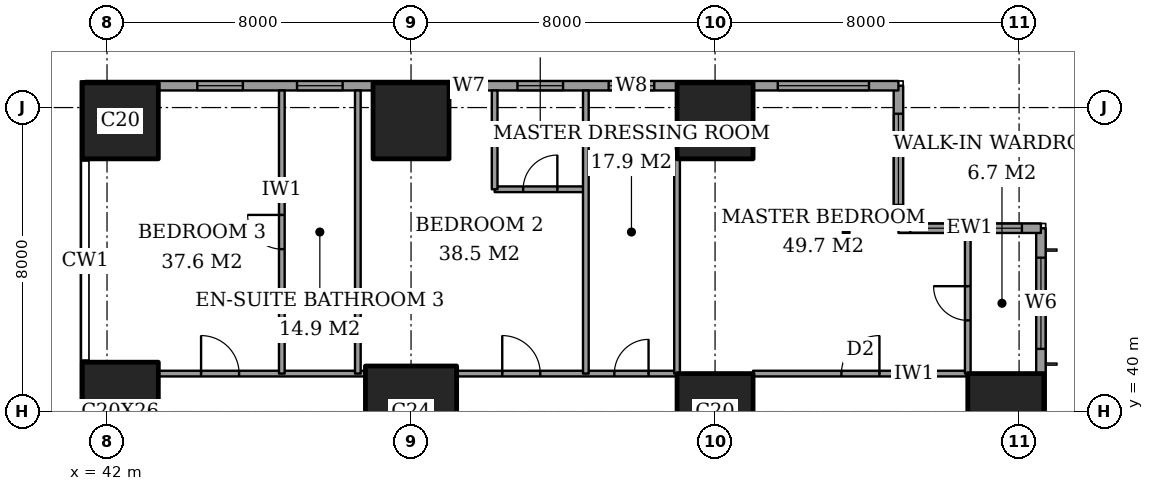
"""IFC4 building model, lengths in metres.
Left out: names, types, materials, properties, quantities, classifications, styles, units other than length and angle.
Written with IfcOpenShell. Run it as: python <this file> out.ifc"""

import sys

from ifc_helpers import new_model, si_unit, direction, frame, frame_2d, origin, origin_2d, place, context, subcontext, project, spatial, rectangle, extrude, element, fill, save


model = new_model("IFC4")
c1 = context("Model", 3, precision=1e-05, world=origin(), true_north=direction((0.0, 1.0)))
c2 = subcontext(c1, "Body", "Model", "MODEL_VIEW")
j1 = project(units=[si_unit("LENGTHUNIT", "METRE"), si_unit("PLANEANGLEUNIT", "RADIAN")], contexts=[c1])
p1 = place(None, origin())
s1 = spatial("IfcSite", under=j1, at=p1, CompositionType="ELEMENT")
p2 = place(p1, origin())
s2 = spatial("IfcBuilding", under=s1, at=p2, CompositionType="ELEMENT")
p3 = place(p2, frame((0.0, 0.0, 40.4)))
s3 = spatial("IfcBuildingStorey", under=s2, at=p3, CompositionType="ELEMENT", Elevation=40.4)
p4 = place(p3, frame((42.35, 40.0, 0.0), z_axis=(0.0, 0.0, 1.0), x_axis=(1.0, 0.0, 0.0)))
e1 = element("IfcColumn", 1, at=p4, inside=s3, PredefinedType="COLUMN", context=c2, shape_type="SweptSolid", body=[
    extrude(rectangle(XDim=2.0, YDim=2.6, at=origin_2d()), origin(), (0.0, 0.0, 1.0), 3.6),
])
p5 = place(p3, frame((42.35, 47.65, 0.0), z_axis=(0.0, 0.0, 1.0), x_axis=(1.0, 0.0, 0.0)))
e2 = element("IfcColumn", 2, at=p5, inside=s3, PredefinedType="COLUMN", context=c2, shape_type="SweptSolid", body=[
    extrude(rectangle(XDim=2.0, YDim=2.0, at=origin_2d()), origin(), (0.0, 0.0, 1.0), 3.6),
])
p6 = place(p3, frame((50.0, 40.0, 0.0), z_axis=(0.0, 0.0, 1.0), x_axis=(1.0, 0.0, 0.0)))
e3 = element("IfcColumn", 3, at=p6, inside=s3, PredefinedType="COLUMN", context=c2, shape_type="SweptSolid", body=[
    extrude(rectangle(XDim=2.4, YDim=2.4, at=origin_2d()), origin(), (0.0, 0.0, 1.0), 3.6),
])
for number, where, z_axis, x_axis in (
    (4, (50.0, 47.65, 0.0), (0.0, 0.0, 1.0), (1.0, 0.0, 0.0)),
    (5, (58.0, 40.0, 0.0), (0.0, 0.0, 1.0), (1.0, 0.0, 0.0)),
    (6, (58.0, 47.65, 0.0), (0.0, 0.0, 1.0), (1.0, 0.0, 0.0)),
    (7, (65.65, 40.0, 0.0), (0.0, 0.0, 1.0), (1.0, 0.0, 0.0)),
):
    element("IfcColumn", number, at=place(p3, frame(where, z_axis=z_axis, x_axis=x_axis)), inside=s3, PredefinedType="COLUMN", context=c2, shape_type="SweptSolid", body=[
        extrude(rectangle(XDim=2.0, YDim=2.0, at=origin_2d()), origin(), (0.0, 0.0, 1.0), 3.6),
    ])
p7 = place(p3, frame((66.575, 3.175, 0.0), z_axis=(0.0, 0.0, 1.0), x_axis=(0.0, 1.0, 0.0)))
e8 = element("IfcWall", 8, at=p7, inside=s3, PredefinedType="SOLIDWALL", context=c2, shape_type="SweptSolid", body=[
    extrude(rectangle(XDim=41.65, YDim=0.25, at=frame_2d((20.825, 0.0))), origin(), (0.0, 0.0, 1.0), 3.6),
])
p8 = place(p7, frame((0.775, 0.0, 0.6)))
e9 = element("IfcOpeningElement", 9, at=p8, cuts=e8, PredefinedType="OPENING", context=c2, shape_type="SweptSolid", body=[
    extrude(rectangle(XDim=2.4, YDim=2.0, at=frame_2d((1.2, 1.0))), frame((0.0, 0.135, 0.0), z_axis=(0.0, -1.0, 0.0), x_axis=(1.0, 0.0, 0.0)), (0.0, 0.0, 1.0), 0.27),
])
p9 = place(p7, frame((6.1, 0.0, 0.6)))
e10 = element("IfcOpeningElement", 10, at=p9, cuts=e8, PredefinedType="OPENING", context=c2, shape_type="SweptSolid", body=[
    extrude(rectangle(XDim=1.2, YDim=2.0, at=frame_2d((0.6, 1.0))), frame((0.0, 0.135, 0.0), z_axis=(0.0, -1.0, 0.0), x_axis=(1.0, 0.0, 0.0)), (0.0, 0.0, 1.0), 0.27),
])
p10 = place(p7, frame((8.275, 0.0, 0.6)))
e11 = element("IfcOpeningElement", 11, at=p10, cuts=e8, PredefinedType="OPENING", context=c2, shape_type="SweptSolid", body=[
    extrude(rectangle(XDim=2.4, YDim=2.0, at=frame_2d((1.2, 1.0))), frame((0.0, 0.135, 0.0), z_axis=(0.0, -1.0, 0.0), x_axis=(1.0, 0.0, 0.0)), (0.0, 0.0, 1.0), 0.27),
])
p11 = place(p7, frame((15.775, 0.0, 0.6)))
e12 = element("IfcOpeningElement", 12, at=p11, cuts=e8, PredefinedType="OPENING", context=c2, shape_type="SweptSolid", body=[
    extrude(rectangle(XDim=2.4, YDim=2.0, at=frame_2d((1.2, 1.0))), frame((0.0, 0.135, 0.0), z_axis=(0.0, -1.0, 0.0), x_axis=(1.0, 0.0, 0.0)), (0.0, 0.0, 1.0), 0.27),
])
p12 = place(p7, frame((23.475, 0.0, 0.6)))
e13 = element("IfcOpeningElement", 13, at=p12, cuts=e8, PredefinedType="OPENING", context=c2, shape_type="SweptSolid", body=[
    extrude(rectangle(XDim=2.4, YDim=2.0, at=frame_2d((1.2, 1.0))), frame((0.0, 0.135, 0.0), z_axis=(0.0, -1.0, 0.0), x_axis=(1.0, 0.0, 0.0)), (0.0, 0.0, 1.0), 0.27),
])
p13 = place(p7, frame((30.975, 0.0, 0.6)))
e14 = element("IfcOpeningElement", 14, at=p13, cuts=e8, PredefinedType="OPENING", context=c2, shape_type="SweptSolid", body=[
    extrude(rectangle(XDim=2.4, YDim=2.0, at=frame_2d((1.2, 1.0))), frame((0.0, 0.135, 0.0), z_axis=(0.0, -1.0, 0.0), x_axis=(1.0, 0.0, 0.0)), (0.0, 0.0, 1.0), 0.27),
])
p14 = place(p7, frame((34.5, 0.0, 0.6)))
e15 = element("IfcOpeningElement", 15, at=p14, cuts=e8, PredefinedType="OPENING", context=c2, shape_type="SweptSolid", body=[
    extrude(rectangle(XDim=1.2, YDim=2.0, at=frame_2d((0.6, 1.0))), frame((0.0, 0.135, 0.0), z_axis=(0.0, -1.0, 0.0), x_axis=(1.0, 0.0, 0.0)), (0.0, 0.0, 1.0), 0.27),
])
p15 = place(p7, frame((38.475, 0.0, 0.6)))
e16 = element("IfcOpeningElement", 16, at=p15, cuts=e8, PredefinedType="OPENING", context=c2, shape_type="SweptSolid", body=[
    extrude(rectangle(XDim=2.4, YDim=2.0, at=frame_2d((1.2, 1.0))), frame((0.0, 0.135, 0.0), z_axis=(0.0, -1.0, 0.0), x_axis=(1.0, 0.0, 0.0)), (0.0, 0.0, 1.0), 0.27),
])
p16 = place(p3, frame((66.575, 44.825, 0.0), z_axis=(0.0, 0.0, 1.0), x_axis=(-1.0, 0.0, 0.0)))
e17 = element("IfcWall", 17, at=p16, inside=s3, PredefinedType="SOLIDWALL", context=c2, shape_type="SweptSolid", body=[
    extrude(rectangle(XDim=3.75, YDim=0.25, at=frame_2d((1.875, 0.0))), origin(), (0.0, 0.0, 1.0), 3.6),
])
p17 = place(p16, frame((0.5, 0.0, 0.6)))
e18 = element("IfcOpeningElement", 18, at=p17, cuts=e17, PredefinedType="OPENING", context=c2, shape_type="SweptSolid", body=[
    extrude(rectangle(XDim=1.2, YDim=2.0, at=frame_2d((0.6, 1.0))), frame((0.0, 0.135, 0.0), z_axis=(0.0, -1.0, 0.0), x_axis=(1.0, 0.0, 0.0)), (0.0, 0.0, 1.0), 0.27),
])
p18 = place(p16, frame((2.238, 0.0, 0.6)))
e19 = element("IfcOpeningElement", 19, at=p18, cuts=e17, PredefinedType="OPENING", context=c2, shape_type="SweptSolid", body=[
    extrude(rectangle(XDim=1.2, YDim=2.0, at=frame_2d((0.6, 1.0))), frame((0.0, 0.135, 0.0), z_axis=(0.0, -1.0, 0.0), x_axis=(1.0, 0.0, 0.0)), (0.0, 0.0, 1.0), 0.27),
])
p19 = place(p3, frame((62.825, 44.825, 0.0), z_axis=(0.0, 0.0, 1.0), x_axis=(0.0, 1.0, 0.0)))
e20 = element("IfcWall", 20, at=p19, inside=s3, PredefinedType="SOLIDWALL", context=c2, shape_type="SweptSolid", body=[
    extrude(rectangle(XDim=3.75, YDim=0.25, at=frame_2d((1.875, 0.0))), origin(), (0.0, 0.0, 1.0), 3.6),
])
p20 = place(p19, frame((0.613, 0.0, 0.6)))
e21 = element("IfcOpeningElement", 21, at=p20, cuts=e20, PredefinedType="OPENING", context=c2, shape_type="SweptSolid", body=[
    extrude(rectangle(XDim=2.4, YDim=2.0, at=frame_2d((1.2, 1.0))), frame((0.0, 0.135, 0.0), z_axis=(0.0, -1.0, 0.0), x_axis=(1.0, 0.0, 0.0)), (0.0, 0.0, 1.0), 0.27),
])
p21 = place(p3, frame((62.825, 48.575, 0.0), z_axis=(0.0, 0.0, 1.0), x_axis=(-1.0, 0.0, 0.0)))
e22 = element("IfcWall", 22, at=p21, inside=s3, PredefinedType="SOLIDWALL", context=c2, shape_type="SweptSolid", body=[
    extrude(rectangle(XDim=21.4, YDim=0.25, at=frame_2d((10.7, 0.0))), origin(), (0.0, 0.0, 1.0), 3.6),
])
p22 = place(p21, frame((0.775, 0.0, 0.6)))
e23 = element("IfcOpeningElement", 23, at=p22, cuts=e22, PredefinedType="OPENING", context=c2, shape_type="SweptSolid", body=[
    extrude(rectangle(XDim=2.4, YDim=2.0, at=frame_2d((1.2, 1.0))), frame((0.0, 0.135, 0.0), z_axis=(0.0, -1.0, 0.0), x_axis=(1.0, 0.0, 0.0)), (0.0, 0.0, 1.0), 0.27),
])
p23 = place(p21, frame((6.425, 0.0, 0.6)))
e24 = element("IfcOpeningElement", 24, at=p23, cuts=e22, PredefinedType="OPENING", context=c2, shape_type="SweptSolid", body=[
    extrude(rectangle(XDim=1.2, YDim=2.0, at=frame_2d((0.6, 1.0))), frame((0.0, 0.135, 0.0), z_axis=(0.0, -1.0, 0.0), x_axis=(1.0, 0.0, 0.0)), (0.0, 0.0, 1.0), 0.27),
])
p24 = place(p21, frame((8.825, 0.0, 0.6)))
e25 = element("IfcOpeningElement", 25, at=p24, cuts=e22, PredefinedType="OPENING", context=c2, shape_type="SweptSolid", body=[
    extrude(rectangle(XDim=1.2, YDim=2.0, at=frame_2d((0.6, 1.0))), frame((0.0, 0.135, 0.0), z_axis=(0.0, -1.0, 0.0), x_axis=(1.0, 0.0, 0.0)), (0.0, 0.0, 1.0), 0.27),
])
p25 = place(p21, frame((11.0, 0.0, 0.6)))
e26 = element("IfcOpeningElement", 26, at=p25, cuts=e22, PredefinedType="OPENING", context=c2, shape_type="SweptSolid", body=[
    extrude(rectangle(XDim=0.6, YDim=2.0, at=frame_2d((0.3, 1.0))), frame((0.0, 0.135, 0.0), z_axis=(0.0, -1.0, 0.0), x_axis=(1.0, 0.0, 0.0)), (0.0, 0.0, 1.0), 0.27),
])
p26 = place(p21, frame((14.625, 0.0, 0.6)))
e27 = element("IfcOpeningElement", 27, at=p26, cuts=e22, PredefinedType="OPENING", context=c2, shape_type="SweptSolid", body=[
    extrude(rectangle(XDim=1.2, YDim=2.0, at=frame_2d((0.6, 1.0))), frame((0.0, 0.135, 0.0), z_axis=(0.0, -1.0, 0.0), x_axis=(1.0, 0.0, 0.0)), (0.0, 0.0, 1.0), 0.27),
])
p27 = place(p21, frame((17.25, 0.0, 0.6)))
e28 = element("IfcOpeningElement", 28, at=p27, cuts=e22, PredefinedType="OPENING", context=c2, shape_type="SweptSolid", body=[
    extrude(rectangle(XDim=1.2, YDim=2.0, at=frame_2d((0.6, 1.0))), frame((0.0, 0.135, 0.0), z_axis=(0.0, -1.0, 0.0), x_axis=(1.0, 0.0, 0.0)), (0.0, 0.0, 1.0), 0.27),
])
p28 = place(p3, frame((43.35, 41.0, 0.0), z_axis=(0.0, 0.0, 1.0), x_axis=(1.0, 0.0, 0.0)))
e29 = element("IfcWall", 29, at=p28, inside=s3, PredefinedType="PARTITIONING", context=c2, shape_type="SweptSolid", body=[
    extrude(rectangle(XDim=5.45, YDim=0.15, at=frame_2d((2.725, 0.0))), origin(), (0.0, 0.0, 1.0), 3.35),
])
p29 = place(p28, frame((1.125, 0.0, 0.0)))
e30 = element("IfcOpeningElement", 30, at=p29, cuts=e29, PredefinedType="OPENING", context=c2, shape_type="SweptSolid", body=[
    extrude(rectangle(XDim=1.0, YDim=2.1, at=frame_2d((0.5, 1.05))), frame((0.0, 0.085, 0.0), z_axis=(0.0, -1.0, 0.0), x_axis=(1.0, 0.0, 0.0)), (0.0, 0.0, 1.0), 0.17),
])
p30 = place(p3, frame((51.2, 41.0, 0.0), z_axis=(0.0, 0.0, 1.0), x_axis=(1.0, 0.0, 0.0)))
e31 = element("IfcWall", 31, at=p30, inside=s3, PredefinedType="PARTITIONING", context=c2, shape_type="SweptSolid", body=[
    extrude(rectangle(XDim=5.8, YDim=0.15, at=frame_2d((2.9, 0.0))), origin(), (0.0, 0.0, 1.0), 3.35),
])
p31 = place(p30, frame((4.15, 0.0, 0.0)))
e32 = element("IfcOpeningElement", 32, at=p31, cuts=e31, PredefinedType="OPENING", context=c2, shape_type="SweptSolid", body=[
    extrude(rectangle(XDim=0.9, YDim=2.1, at=frame_2d((0.45, 1.05))), frame((0.0, 0.085, 0.0), z_axis=(0.0, -1.0, 0.0), x_axis=(1.0, 0.0, 0.0)), (0.0, 0.0, 1.0), 0.17),
])
p32 = place(p30, frame((1.2, 0.0, 0.0)))
e33 = element("IfcOpeningElement", 33, at=p32, cuts=e31, PredefinedType="OPENING", context=c2, shape_type="SweptSolid", body=[
    extrude(rectangle(XDim=1.0, YDim=2.1, at=frame_2d((0.5, 1.05))), frame((0.0, 0.085, 0.0), z_axis=(0.0, -1.0, 0.0), x_axis=(1.0, 0.0, 0.0)), (0.0, 0.0, 1.0), 0.17),
])
p33 = place(p3, frame((59.0, 41.0, 0.0), z_axis=(0.0, 0.0, 1.0), x_axis=(1.0, 0.0, 0.0)))
e34 = element("IfcWall", 34, at=p33, inside=s3, PredefinedType="PARTITIONING", context=c2, shape_type="SweptSolid", body=[
    extrude(rectangle(XDim=5.65, YDim=0.15, at=frame_2d((2.825, 0.0))), origin(), (0.0, 0.0, 1.0), 3.35),
])
p34 = place(p33, frame((2.325, 0.0, 0.0)))
e35 = element("IfcOpeningElement", 35, at=p34, cuts=e34, PredefinedType="OPENING", context=c2, shape_type="SweptSolid", body=[
    extrude(rectangle(XDim=1.0, YDim=2.1, at=frame_2d((0.5, 1.05))), frame((0.0, 0.085, 0.0), z_axis=(0.0, -1.0, 0.0), x_axis=(1.0, 0.0, 0.0)), (0.0, 0.0, 1.0), 0.17),
])
p35 = place(p3, frame((52.2, 45.85, 0.0), z_axis=(0.0, 0.0, 1.0), x_axis=(1.0, 0.0, 0.0)))
e36 = element("IfcWall", 36, at=p35, inside=s3, PredefinedType="PARTITIONING", context=c2, shape_type="SweptSolid", body=[
    extrude(rectangle(XDim=2.4, YDim=0.15, at=frame_2d((1.2, 0.0))), origin(), (0.0, 0.0, 1.0), 3.35),
])
p36 = place(p35, frame((0.75, 0.0, 0.0)))
e37 = element("IfcOpeningElement", 37, at=p36, cuts=e36, PredefinedType="OPENING", context=c2, shape_type="SweptSolid", body=[
    extrude(rectangle(XDim=0.9, YDim=2.1, at=frame_2d((0.45, 1.05))), frame((0.0, 0.085, 0.0), z_axis=(0.0, -1.0, 0.0), x_axis=(1.0, 0.0, 0.0)), (0.0, 0.0, 1.0), 0.17),
])
p37 = place(p3, frame((46.6, 41.0, 0.0), z_axis=(0.0, 0.0, 1.0), x_axis=(0.0, 1.0, 0.0)))
e38 = element("IfcWall", 38, at=p37, inside=s3, PredefinedType="PARTITIONING", context=c2, shape_type="SweptSolid", body=[
    extrude(rectangle(XDim=7.45, YDim=0.15, at=frame_2d((3.725, 0.0))), origin(), (0.0, 0.0, 1.0), 3.35),
])
p38 = place(p37, frame((3.275, 0.0, 0.0)))
e39 = element("IfcOpeningElement", 39, at=p38, cuts=e38, PredefinedType="OPENING", context=c2, shape_type="SweptSolid", body=[
    extrude(rectangle(XDim=0.9, YDim=2.1, at=frame_2d((0.45, 1.05))), frame((0.0, 0.085, 0.0), z_axis=(0.0, -1.0, 0.0), x_axis=(1.0, 0.0, 0.0)), (0.0, 0.0, 1.0), 0.17),
])
p39 = place(p3, frame((48.6, 41.0, 0.0), z_axis=(0.0, 0.0, 1.0), x_axis=(0.0, 1.0, 0.0)))
e40 = element("IfcWall", 40, at=p39, inside=s3, PredefinedType="PARTITIONING", context=c2, shape_type="SweptSolid", body=[
    extrude(rectangle(XDim=7.45, YDim=0.15, at=frame_2d((3.725, 0.0))), origin(), (0.0, 0.0, 1.0), 3.35),
])
p40 = place(p3, frame((52.2, 45.85, 0.0), z_axis=(0.0, 0.0, 1.0), x_axis=(0.0, 1.0, 0.0)))
e41 = element("IfcWall", 41, at=p40, inside=s3, PredefinedType="PARTITIONING", context=c2, shape_type="SweptSolid", body=[
    extrude(rectangle(XDim=2.6, YDim=0.15, at=frame_2d((1.3, 0.0))), origin(), (0.0, 0.0, 1.0), 3.35),
])
p41 = place(p3, frame((54.6, 41.0, 0.0), z_axis=(0.0, 0.0, 1.0), x_axis=(0.0, 1.0, 0.0)))
e42 = element("IfcWall", 42, at=p41, inside=s3, PredefinedType="PARTITIONING", context=c2, shape_type="SweptSolid", body=[
    extrude(rectangle(XDim=7.45, YDim=0.15, at=frame_2d((3.725, 0.0))), origin(), (0.0, 0.0, 1.0), 3.35),
])
p42 = place(p3, frame((57.0, 41.0, 0.0), z_axis=(0.0, 0.0, 1.0), x_axis=(0.0, 1.0, 0.0)))
e43 = element("IfcWall", 43, at=p42, inside=s3, PredefinedType="PARTITIONING", context=c2, shape_type="SweptSolid", body=[
    extrude(rectangle(XDim=5.65, YDim=0.15, at=frame_2d((2.825, 0.0))), origin(), (0.0, 0.0, 1.0), 3.35),
])
p43 = place(p3, frame((64.65, 41.0, 0.0), z_axis=(0.0, 0.0, 1.0), x_axis=(0.0, 1.0, 0.0)))
e44 = element("IfcWall", 44, at=p43, inside=s3, PredefinedType="PARTITIONING", context=c2, shape_type="SweptSolid", body=[
    extrude(rectangle(XDim=3.7, YDim=0.15, at=frame_2d((1.85, 0.0))), origin(), (0.0, 0.0, 1.0), 3.35),
])
p44 = place(p43, frame((1.4, 0.0, 0.0)))
e45 = element("IfcOpeningElement", 45, at=p44, cuts=e44, PredefinedType="OPENING", context=c2, shape_type="SweptSolid", body=[
    extrude(rectangle(XDim=0.9, YDim=2.1, at=frame_2d((0.45, 1.05))), frame((0.0, 0.085, 0.0), z_axis=(0.0, -1.0, 0.0), x_axis=(1.0, 0.0, 0.0)), (0.0, 0.0, 1.0), 0.17),
])
p45 = place(p15, origin())
e46 = element("IfcWindow", 46, at=p45, inside=s3, PartitioningType="SINGLE_PANEL", PredefinedType="WINDOW", context=c2, shape_type="SweptSolid", body=[
    extrude(rectangle(XDim=2.4, YDim=2.0, at=frame_2d((1.2, 1.0))), frame((0.0, 0.03, 0.0), z_axis=(0.0, -1.0, 0.0), x_axis=(1.0, 0.0, 0.0)), (0.0, 0.0, 1.0), 0.06),
])
fill(e16, e46)
p46 = place(p17, origin())
e47 = element("IfcWindow", 47, at=p46, inside=s3, PartitioningType="SINGLE_PANEL", PredefinedType="WINDOW", context=c2, shape_type="SweptSolid", body=[
    extrude(rectangle(XDim=1.2, YDim=2.0, at=frame_2d((0.6, 1.0))), frame((0.0, 0.03, 0.0), z_axis=(0.0, -1.0, 0.0), x_axis=(1.0, 0.0, 0.0)), (0.0, 0.0, 1.0), 0.06),
])
fill(e18, e47)
p47 = place(p18, origin())
e48 = element("IfcWindow", 48, at=p47, inside=s3, PartitioningType="SINGLE_PANEL", PredefinedType="WINDOW", context=c2, shape_type="SweptSolid", body=[
    extrude(rectangle(XDim=1.2, YDim=2.0, at=frame_2d((0.6, 1.0))), frame((0.0, 0.03, 0.0), z_axis=(0.0, -1.0, 0.0), x_axis=(1.0, 0.0, 0.0)), (0.0, 0.0, 1.0), 0.06),
])
fill(e19, e48)
p48 = place(p20, origin())
e49 = element("IfcWindow", 49, at=p48, inside=s3, PartitioningType="SINGLE_PANEL", PredefinedType="WINDOW", context=c2, shape_type="SweptSolid", body=[
    extrude(rectangle(XDim=2.4, YDim=2.0, at=frame_2d((1.2, 1.0))), frame((0.0, 0.03, 0.0), z_axis=(0.0, -1.0, 0.0), x_axis=(1.0, 0.0, 0.0)), (0.0, 0.0, 1.0), 0.06),
])
fill(e21, e49)
p49 = place(p22, origin())
e50 = element("IfcWindow", 50, at=p49, inside=s3, PartitioningType="SINGLE_PANEL", PredefinedType="WINDOW", context=c2, shape_type="SweptSolid", body=[
    extrude(rectangle(XDim=2.4, YDim=2.0, at=frame_2d((1.2, 1.0))), frame((0.0, 0.03, 0.0), z_axis=(0.0, -1.0, 0.0), x_axis=(1.0, 0.0, 0.0)), (0.0, 0.0, 1.0), 0.06),
])
fill(e23, e50)
p50 = place(p23, origin())
e51 = element("IfcWindow", 51, at=p50, inside=s3, PartitioningType="SINGLE_PANEL", PredefinedType="WINDOW", context=c2, shape_type="SweptSolid", body=[
    extrude(rectangle(XDim=1.2, YDim=2.0, at=frame_2d((0.6, 1.0))), frame((0.0, 0.03, 0.0), z_axis=(0.0, -1.0, 0.0), x_axis=(1.0, 0.0, 0.0)), (0.0, 0.0, 1.0), 0.06),
])
fill(e24, e51)
p51 = place(p24, origin())
e52 = element("IfcWindow", 52, at=p51, inside=s3, PartitioningType="SINGLE_PANEL", PredefinedType="WINDOW", context=c2, shape_type="SweptSolid", body=[
    extrude(rectangle(XDim=1.2, YDim=2.0, at=frame_2d((0.6, 1.0))), frame((0.0, 0.03, 0.0), z_axis=(0.0, -1.0, 0.0), x_axis=(1.0, 0.0, 0.0)), (0.0, 0.0, 1.0), 0.06),
])
fill(e25, e52)
p52 = place(p25, origin())
e53 = element("IfcWindow", 53, at=p52, inside=s3, PartitioningType="SINGLE_PANEL", PredefinedType="WINDOW", context=c2, shape_type="SweptSolid", body=[
    extrude(rectangle(XDim=0.6, YDim=2.0, at=frame_2d((0.3, 1.0))), frame((0.0, 0.03, 0.0), z_axis=(0.0, -1.0, 0.0), x_axis=(1.0, 0.0, 0.0)), (0.0, 0.0, 1.0), 0.06),
])
fill(e26, e53)
p53 = place(p26, origin())
e54 = element("IfcWindow", 54, at=p53, inside=s3, PartitioningType="SINGLE_PANEL", PredefinedType="WINDOW", context=c2, shape_type="SweptSolid", body=[
    extrude(rectangle(XDim=1.2, YDim=2.0, at=frame_2d((0.6, 1.0))), frame((0.0, 0.03, 0.0), z_axis=(0.0, -1.0, 0.0), x_axis=(1.0, 0.0, 0.0)), (0.0, 0.0, 1.0), 0.06),
])
fill(e27, e54)
p54 = place(p27, origin())
e55 = element("IfcWindow", 55, at=p54, inside=s3, PartitioningType="SINGLE_PANEL", PredefinedType="WINDOW", context=c2, shape_type="SweptSolid", body=[
    extrude(rectangle(XDim=1.2, YDim=2.0, at=frame_2d((0.6, 1.0))), frame((0.0, 0.03, 0.0), z_axis=(0.0, -1.0, 0.0), x_axis=(1.0, 0.0, 0.0)), (0.0, 0.0, 1.0), 0.06),
])
fill(e28, e55)
p55 = place(p44, origin())
e56 = element("IfcDoor", 56, at=p55, inside=s3, OperationType="SINGLE_SWING_LEFT", PredefinedType="DOOR", context=c2, shape_type="SweptSolid", body=[
    extrude(rectangle(XDim=0.9, YDim=2.1, at=frame_2d((0.45, 1.05))), frame((0.0, 0.025, 0.0), z_axis=(0.0, -1.0, 0.0), x_axis=(1.0, 0.0, 0.0)), (0.0, 0.0, 1.0), 0.05),
])
fill(e45, e56)
p56 = place(p34, origin())
e57 = element("IfcDoor", 57, at=p56, inside=s3, OperationType="SINGLE_SWING_LEFT", PredefinedType="DOOR", context=c2, shape_type="SweptSolid", body=[
    extrude(rectangle(XDim=1.0, YDim=2.1, at=frame_2d((0.5, 1.05))), frame((0.0, 0.025, 0.0), z_axis=(0.0, -1.0, 0.0), x_axis=(1.0, 0.0, 0.0)), (0.0, 0.0, 1.0), 0.05),
])
fill(e35, e57)
p57 = place(p31, origin())
e58 = element("IfcDoor", 58, at=p57, inside=s3, OperationType="SINGLE_SWING_LEFT", PredefinedType="DOOR", context=c2, shape_type="SweptSolid", body=[
    extrude(rectangle(XDim=0.9, YDim=2.1, at=frame_2d((0.45, 1.05))), frame((0.0, 0.025, 0.0), z_axis=(0.0, -1.0, 0.0), x_axis=(1.0, 0.0, 0.0)), (0.0, 0.0, 1.0), 0.05),
])
fill(e32, e58)
p58 = place(p36, origin())
e59 = element("IfcDoor", 59, at=p58, inside=s3, OperationType="SINGLE_SWING_LEFT", PredefinedType="DOOR", context=c2, shape_type="SweptSolid", body=[
    extrude(rectangle(XDim=0.9, YDim=2.1, at=frame_2d((0.45, 1.05))), frame((0.0, 0.025, 0.0), z_axis=(0.0, -1.0, 0.0), x_axis=(1.0, 0.0, 0.0)), (0.0, 0.0, 1.0), 0.05),
])
fill(e37, e59)
p59 = place(p32, origin())
e60 = element("IfcDoor", 60, at=p59, inside=s3, OperationType="SINGLE_SWING_RIGHT", PredefinedType="DOOR", context=c2, shape_type="SweptSolid", body=[
    extrude(rectangle(XDim=1.0, YDim=2.1, at=frame_2d((0.5, 1.05))), frame((0.0, 0.025, 0.0), z_axis=(0.0, -1.0, 0.0), x_axis=(1.0, 0.0, 0.0)), (0.0, 0.0, 1.0), 0.05),
])
fill(e33, e60)
p60 = place(p38, origin())
e61 = element("IfcDoor", 61, at=p60, inside=s3, OperationType="SINGLE_SWING_LEFT", PredefinedType="DOOR", context=c2, shape_type="SweptSolid", body=[
    extrude(rectangle(XDim=0.9, YDim=2.1, at=frame_2d((0.45, 1.05))), frame((0.0, 0.025, 0.0), z_axis=(0.0, -1.0, 0.0), x_axis=(1.0, 0.0, 0.0)), (0.0, 0.0, 1.0), 0.05),
])
fill(e39, e61)
p61 = place(p29, origin())
e62 = element("IfcDoor", 62, at=p61, inside=s3, OperationType="SINGLE_SWING_RIGHT", PredefinedType="DOOR", context=c2, shape_type="SweptSolid", body=[
    extrude(rectangle(XDim=1.0, YDim=2.1, at=frame_2d((0.5, 1.05))), frame((0.0, 0.025, 0.0), z_axis=(0.0, -1.0, 0.0), x_axis=(1.0, 0.0, 0.0)), (0.0, 0.0, 1.0), 0.05),
])
fill(e30, e62)
save(model, sys.argv[1])
